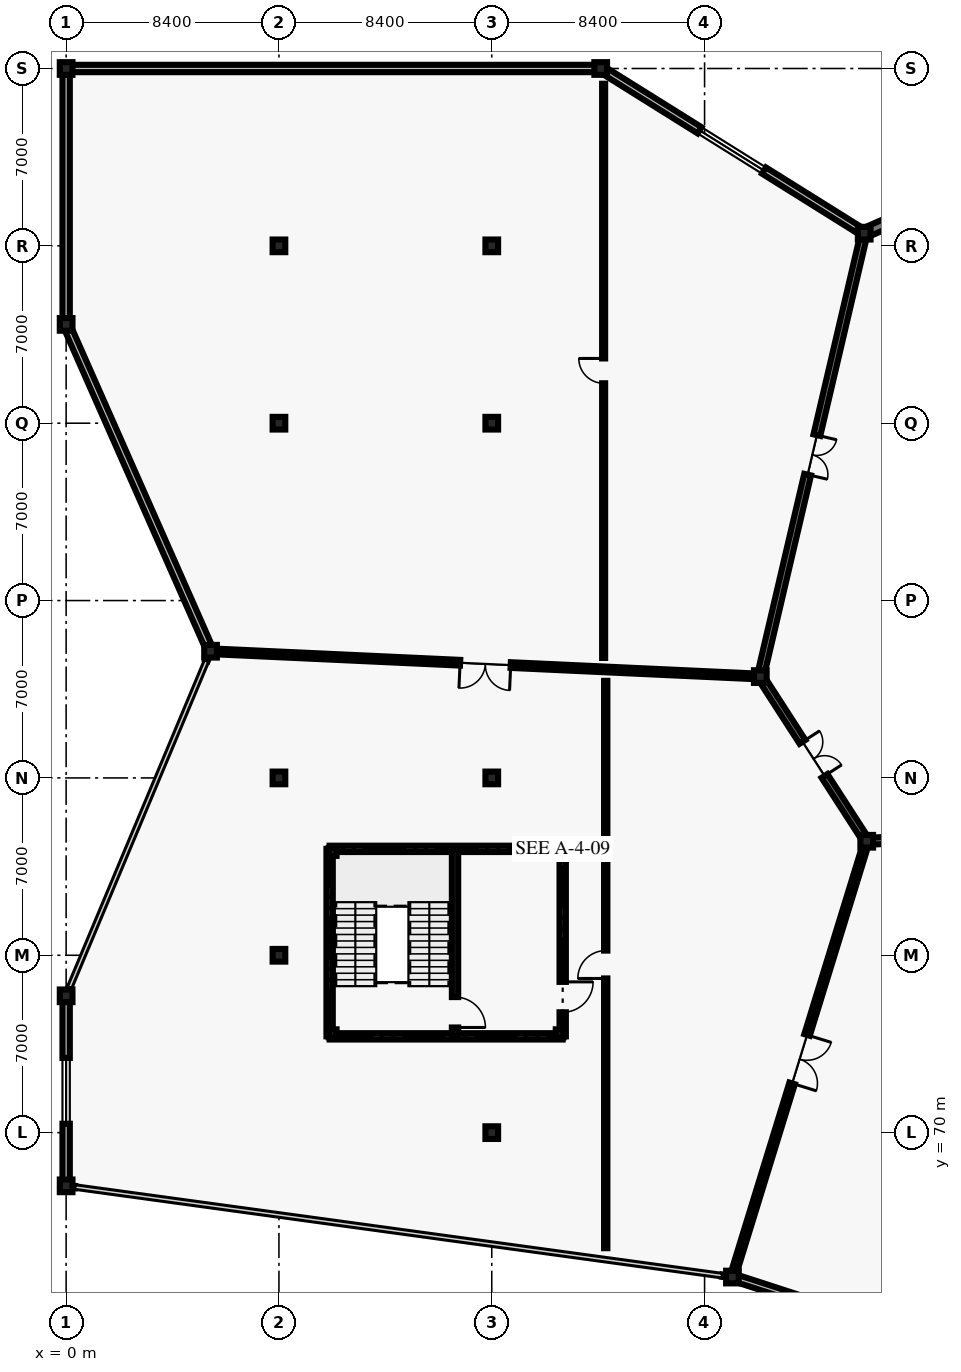
"""IFC4 building model, lengths in metres.
Left out: names, types, materials, properties, quantities, classifications, styles, units other than length and angle.
Written with IfcOpenShell. Run it as: python <this file> out.ifc"""

import sys

from ifc_helpers import new_model, si_unit, direction, frame, frame_2d, origin, origin_2d, place, context, subcontext, project, spatial, rectangle, i_section, extrude, element, fill, save


model = new_model("IFC4")
c1 = context("Model", 3, precision=1e-05, world=origin(), true_north=direction((0.0, 1.0)))
c2 = subcontext(c1, "Body", "Model", "MODEL_VIEW")
j1 = project(units=[si_unit("LENGTHUNIT", "METRE"), si_unit("PLANEANGLEUNIT", "RADIAN")], contexts=[c1])
p1 = place(None, origin())
s1 = spatial("IfcSite", under=j1, at=p1, CompositionType="ELEMENT")
p2 = place(p1, origin())
s2 = spatial("IfcBuilding", under=s1, at=p2, CompositionType="ELEMENT")
p3 = place(p2, frame((0.0, 0.0, 5.4)))
s3 = spatial("IfcBuildingStorey", under=s2, at=p3, CompositionType="ELEMENT", Elevation=5.4)
for number, where, z_axis, x_axis in (
    (1, (0.0, 67.9, 0.0), (0.0, 0.0, 1.0), (1.0, 0.0, 0.0)),
    (2, (0.0, 75.4, 0.0), (0.0, 0.0, 1.0), (1.0, 0.0, 0.0)),
    (3, (0.0, 101.9, 0.0), (0.0, 0.0, 1.0), (1.0, 0.0, 0.0)),
    (4, (0.0, 112.0, 0.0), (0.0, 0.0, 1.0), (1.0, 0.0, 0.0)),
    (5, (5.7, 89.0, 0.0), (0.0, 0.0, 1.0), (1.0, 0.0, 0.0)),
    (6, (21.1, 112.0, 0.0), (0.0, 0.0, 1.0), (1.0, 0.0, 0.0)),
    (7, (26.3, 64.3, 0.0), (0.0, 0.0, 1.0), (1.0, 0.0, 0.0)),
    (8, (27.4, 88.0, 0.0), (0.0, 0.0, 1.0), (1.0, 0.0, 0.0)),
    (9, (31.5, 105.5, 0.0), (0.0, 0.0, 1.0), (1.0, 0.0, 0.0)),
    (10, (31.6, 81.5, 0.0), (0.0, 0.0, 1.0), (1.0, 0.0, 0.0)),
    (11, (8.4, 77.0, 0.0), (0.0, 0.0, 1.0), (1.0, 0.0, 0.0)),
    (12, (8.4, 84.0, 0.0), (0.0, 0.0, 1.0), (1.0, 0.0, 0.0)),
    (13, (16.8, 70.0, 0.0), (0.0, 0.0, 1.0), (1.0, 0.0, 0.0)),
    (14, (16.8, 84.0, 0.0), (0.0, 0.0, 1.0), (1.0, 0.0, 0.0)),
    (15, (8.4, 98.0, 0.0), (0.0, 0.0, 1.0), (1.0, 0.0, 0.0)),
    (16, (8.4, 105.0, 0.0), (0.0, 0.0, 1.0), (1.0, 0.0, 0.0)),
    (17, (16.8, 98.0, 0.0), (0.0, 0.0, 1.0), (1.0, 0.0, 0.0)),
    (18, (16.8, 105.0, 0.0), (0.0, 0.0, 1.0), (1.0, 0.0, 0.0)),
):
    element("IfcColumn", number, at=place(p3, frame(where, z_axis=z_axis, x_axis=x_axis)), inside=s3, PredefinedType="COLUMN", context=c2, shape_type="SweptSolid", body=[
        extrude(rectangle(XDim=0.5, YDim=0.5, at=origin_2d()), origin(), (0.0, 0.0, 1.0), 4.8),
    ])
for number, where, z_axis, x_axis in (
    (19, (10.52, 73.92, 0.0), (0.0, 0.0, 1.0), (1.0, 0.0, 0.0)),
    (20, (19.48, 73.92, 0.0), (0.0, 0.0, 1.0), (1.0, 0.0, 0.0)),
    (21, (19.48, 81.08, 0.0), (0.0, 0.0, 1.0), (1.0, 0.0, 0.0)),
    (22, (10.52, 81.08, 0.0), (0.0, 0.0, 1.0), (1.0, 0.0, 0.0)),
):
    element("IfcColumn", number, at=place(p3, frame(where, z_axis=z_axis, x_axis=x_axis)), inside=s3, PredefinedType="COLUMN", context=c2, shape_type="SweptSolid", body=[
        extrude(i_section(OverallWidth=0.307, OverallDepth=0.315, WebThickness=0.012, FlangeThickness=0.019, FilletRadius=0.017, at=origin_2d()), origin(), (0.0, 0.0, 1.0), 4.8),
    ])
p4 = place(p3, frame((49.943, 56.619, 0.0), z_axis=(0.0, 0.0, 1.0), x_axis=(-0.951074357174, 0.308962080402, 0.0)))
e23 = element("IfcWall", 23, at=p4, inside=s3, PredefinedType="SOLIDWALL", context=c2, shape_type="SweptSolid", body=[
    extrude(rectangle(XDim=24.8, YDim=0.29, at=frame_2d((12.4, 0.0))), origin(), (0.0, 0.0, 1.0), 3.62),
])
p5 = place(p4, frame((11.3, 0.0, 0.95)))
e24 = element("IfcOpeningElement", 24, at=p5, cuts=e23, PredefinedType="OPENING", context=c2, shape_type="SweptSolid", body=[
    extrude(rectangle(XDim=2.2, YDim=2.1, at=frame_2d((1.1, 1.05))), frame((0.0, 0.155, 0.0), z_axis=(0.0, -1.0, 0.0), x_axis=(1.0, 0.0, 0.0)), (0.0, 0.0, 1.0), 0.31),
])
p6 = place(p3, frame((31.555, 105.524, 0.0), z_axis=(0.0, 0.0, 1.0), x_axis=(0.915561631163, 0.402177696474, 0.0)))
e25 = element("IfcWall", 25, at=p6, inside=s3, PredefinedType="SOLIDWALL", context=c2, shape_type="SweptSolid", body=[
    extrude(rectangle(XDim=11.627, YDim=0.4, at=frame_2d((5.813, 0.0))), origin(), (0.0, 0.0, 1.0), 3.62),
])
p7 = place(p3, frame((0.0, 67.9, 0.0), z_axis=(0.0, 0.0, 1.0), x_axis=(0.0, 1.0, 0.0)))
e26 = element("IfcWall", 26, at=p7, inside=s3, PredefinedType="SOLIDWALL", context=c2, shape_type="SweptSolid", body=[
    extrude(rectangle(XDim=7.5, YDim=0.29, at=frame_2d((3.75, 0.0))), origin(), (0.0, 0.0, 1.0), 3.62),
])
p8 = place(p7, frame((2.45, 0.0, 0.95)))
e27 = element("IfcOpeningElement", 27, at=p8, cuts=e26, PredefinedType="OPENING", context=c2, shape_type="SweptSolid", body=[
    extrude(rectangle(XDim=2.6, YDim=2.1, at=frame_2d((1.3, 1.05))), frame((0.0, 0.155, 0.0), z_axis=(0.0, -1.0, 0.0), x_axis=(1.0, 0.0, 0.0)), (0.0, 0.0, 1.0), 0.31),
])
for number, where, z_axis, x_axis in (
    (28, (26.199, 64.314, 0.0), (0.0, 0.0, 1.0), (-0.991, 0.133, 0.0)),
    (29, (0.347, 67.853, 0.0), (0.0, 0.0, 1.0), (-0.991, 0.133, 0.0)),
):
    element("IfcWall", number, at=place(p3, frame(where, z_axis=z_axis, x_axis=x_axis)), inside=s3, PredefinedType="SOLIDWALL", context=c2, shape_type="SweptSolid", body=[
        extrude(rectangle(XDim=0.308, YDim=0.095, at=frame_2d((0.154, 0.0))), origin(), (0.0, 0.0, 1.0), 3.62),
    ])
for number, where, z_axis, x_axis in (
    (30, (0.016, 75.439, 0.0), (0.0, 0.0, 1.0), (0.386, 0.922, 0.0)),
    (31, (5.542, 88.622, 0.0), (0.0, 0.0, 1.0), (0.386, 0.922, 0.0)),
):
    element("IfcWall", number, at=place(p3, frame(where, z_axis=z_axis, x_axis=x_axis)), inside=s3, PredefinedType="SOLIDWALL", context=c2, shape_type="SweptSolid", body=[
        extrude(rectangle(XDim=0.308, YDim=0.095, at=frame_2d((0.154, 0.0))), origin(), (0.0, 0.0, 1.0), 3.62),
    ])
p9 = place(p3, frame((21.1, 112.0, 0.0), z_axis=(0.0, 0.0, 1.0), x_axis=(0.84799942789, -0.529997141784, 0.0)))
e32 = element("IfcWall", 32, at=p9, inside=s3, PredefinedType="SOLIDWALL", context=c2, shape_type="SweptSolid", body=[
    extrude(rectangle(XDim=12.204, YDim=0.29, at=frame_2d((6.102, 0.0))), origin(), (0.0, 0.0, 1.0), 3.62),
])
p10 = place(p9, frame((4.602, 0.0, 0.95)))
e33 = element("IfcOpeningElement", 33, at=p10, cuts=e32, PredefinedType="OPENING", context=c2, shape_type="SweptSolid", body=[
    extrude(rectangle(XDim=3.0, YDim=2.1, at=frame_2d((1.5, 1.05))), frame((0.0, 0.155, 0.0), z_axis=(0.0, -1.0, 0.0), x_axis=(1.0, 0.0, 0.0)), (0.0, 0.0, 1.0), 0.31),
])
p11 = place(p3, frame((0.0, 112.0, 0.0), z_axis=(0.0, 0.0, 1.0), x_axis=(1.0, 0.0, 0.0)))
e34 = element("IfcWall", 34, at=p11, inside=s3, PredefinedType="SOLIDWALL", context=c2, shape_type="SweptSolid", body=[
    extrude(rectangle(XDim=21.1, YDim=0.29, at=frame_2d((10.55, 0.0))), origin(), (0.0, 0.0, 1.0), 3.62),
])
p12 = place(p3, frame((0.0, 101.9, 0.0), z_axis=(0.0, 0.0, 1.0), x_axis=(0.0, 1.0, 0.0)))
e35 = element("IfcWall", 35, at=p12, inside=s3, PredefinedType="SOLIDWALL", context=c2, shape_type="SweptSolid", body=[
    extrude(rectangle(XDim=10.1, YDim=0.29, at=frame_2d((5.05, 0.0))), origin(), (0.0, 0.0, 1.0), 3.62),
])
p13 = place(p3, frame((5.676, 89.055, 0.0), z_axis=(0.0, 0.0, 1.0), x_axis=(-0.404184143846, 0.914677636035, 0.0)))
e36 = element("IfcWall", 36, at=p13, inside=s3, PredefinedType="SOLIDWALL", context=c2, shape_type="SweptSolid", body=[
    extrude(rectangle(XDim=14.043, YDim=0.29, at=frame_2d((7.021, 0.0))), origin(), (0.0, 0.0, 1.0), 3.62),
])
p14 = place(p3, frame((57.8, 82.6, 0.0), z_axis=(0.0, 0.0, 1.0), x_axis=(-0.999119645224, -0.041951573605, 0.0)))
e37 = element("IfcWall", 37, at=p14, inside=s3, PredefinedType="SOLIDWALL", context=c2, shape_type="SweptSolid", body=[
    extrude(rectangle(XDim=26.223, YDim=0.275, at=frame_2d((13.112, 0.0))), origin(), (0.0, 0.0, 1.0), 4.02),
])
p15 = place(p14, frame((12.312, 0.0, 0.0)))
e38 = element("IfcOpeningElement", 38, at=p15, cuts=e37, PredefinedType="OPENING", context=c2, shape_type="SweptSolid", body=[
    extrude(rectangle(XDim=1.6, YDim=2.45, at=frame_2d((0.8, 1.225))), frame((0.0, 0.147, 0.0), z_axis=(0.0, -1.0, 0.0), x_axis=(1.0, 0.0, 0.0)), (0.0, 0.0, 1.0), 0.295),
])
p16 = place(p3, frame((31.6, 81.5, 0.0), z_axis=(0.0, 0.0, 1.0), x_axis=(-0.294479498062, -0.955657797133, 0.0)))
e39 = element("IfcWall", 39, at=p16, inside=s3, PredefinedType="SOLIDWALL", context=c2, shape_type="SweptSolid", body=[
    extrude(rectangle(XDim=17.998, YDim=0.225, at=frame_2d((8.999, 0.0))), origin(), (0.0, 0.0, 1.0), 4.02),
])
p17 = place(p16, frame((7.999, 0.0, 0.0)))
e40 = element("IfcOpeningElement", 40, at=p17, cuts=e39, PredefinedType="OPENING", context=c2, shape_type="SweptSolid", body=[
    extrude(rectangle(XDim=2.0, YDim=2.5, at=frame_2d((1.0, 1.25))), frame((0.0, 0.123, 0.0), z_axis=(0.0, -1.0, 0.0), x_axis=(1.0, 0.0, 0.0)), (0.0, 0.0, 1.0), 0.245),
])
p18 = place(p3, frame((27.4, 88.0, 0.0), z_axis=(0.0, 0.0, 1.0), x_axis=(0.542733189748, -0.839905164138, 0.0)))
e41 = element("IfcWall", 41, at=p18, inside=s3, PredefinedType="SOLIDWALL", context=c2, shape_type="SweptSolid", body=[
    extrude(rectangle(XDim=7.739, YDim=0.275, at=frame_2d((3.87, 0.0))), origin(), (0.0, 0.0, 1.0), 4.02),
])
p19 = place(p18, frame((3.069, 0.0, 0.0)))
e42 = element("IfcOpeningElement", 42, at=p19, cuts=e41, PredefinedType="OPENING", context=c2, shape_type="SweptSolid", body=[
    extrude(rectangle(XDim=1.6, YDim=2.45, at=frame_2d((0.8, 1.225))), frame((0.0, 0.147, 0.0), z_axis=(0.0, -1.0, 0.0), x_axis=(1.0, 0.0, 0.0)), (0.0, 0.0, 1.0), 0.295),
])
p20 = place(p3, frame((31.5, 105.5, 0.0), z_axis=(0.0, 0.0, 1.0), x_axis=(-0.228114067381, -0.973634414071, 0.0)))
e43 = element("IfcWall", 43, at=p20, inside=s3, PredefinedType="SOLIDWALL", context=c2, shape_type="SweptSolid", body=[
    extrude(rectangle(XDim=17.974, YDim=0.275, at=frame_2d((8.987, 0.0))), origin(), (0.0, 0.0, 1.0), 4.02),
])
p21 = place(p20, frame((8.187, 0.0, 0.0)))
e44 = element("IfcOpeningElement", 44, at=p21, cuts=e43, PredefinedType="OPENING", context=c2, shape_type="SweptSolid", body=[
    extrude(rectangle(XDim=1.6, YDim=2.45, at=frame_2d((0.8, 1.225))), frame((0.0, 0.147, 0.0), z_axis=(0.0, -1.0, 0.0), x_axis=(1.0, 0.0, 0.0)), (0.0, 0.0, 1.0), 0.295),
])
p22 = place(p3, frame((27.4, 88.0, 0.0), z_axis=(0.0, 0.0, 1.0), x_axis=(-0.998939864331, 0.046034198714, 0.0)))
e45 = element("IfcWall", 45, at=p22, inside=s3, PredefinedType="SOLIDWALL", context=c2, shape_type="SweptSolid", body=[
    extrude(rectangle(XDim=21.723, YDim=0.225, at=frame_2d((10.861, 0.0))), origin(), (0.0, 0.0, 1.0), 4.02),
])
p23 = place(p22, frame((9.862, 0.0, 0.0)))
e46 = element("IfcOpeningElement", 46, at=p23, cuts=e45, PredefinedType="OPENING", context=c2, shape_type="SweptSolid", body=[
    extrude(rectangle(XDim=2.0, YDim=2.5, at=frame_2d((1.0, 1.25))), frame((0.0, 0.123, 0.0), z_axis=(0.0, -1.0, 0.0), x_axis=(1.0, 0.0, 0.0)), (0.0, 0.0, 1.0), 0.245),
])
p24 = place(p3, frame((21.298, 65.439, 0.0), z_axis=(0.0, 0.0, 1.0), x_axis=(0.0, 1.0, 0.0)))
e47 = element("IfcWall", 47, at=p24, inside=s3, PredefinedType="PARTITIONING", context=c2, shape_type="SweptSolid", body=[
    extrude(rectangle(XDim=22.392, YDim=0.13, at=frame_2d((11.196, 0.0))), origin(), (0.0, 0.0, 1.0), 3.32),
])
p25 = place(p24, frame((10.646, 0.0, 0.0)))
e48 = element("IfcOpeningElement", 48, at=p25, cuts=e47, PredefinedType="OPENING", context=c2, shape_type="SweptSolid", body=[
    extrude(rectangle(XDim=1.1, YDim=2.2, at=frame_2d((0.55, 1.1))), frame((0.0, 0.075, 0.0), z_axis=(0.0, -1.0, 0.0), x_axis=(1.0, 0.0, 0.0)), (0.0, 0.0, 1.0), 0.15),
])
p26 = place(p3, frame((21.216, 88.735, 0.0), z_axis=(0.0, 0.0, 1.0), x_axis=(0.0, 1.0, 0.0)))
e49 = element("IfcWall", 49, at=p26, inside=s3, PredefinedType="PARTITIONING", context=c2, shape_type="SweptSolid", body=[
    extrude(rectangle(XDim=22.662, YDim=0.12, at=frame_2d((11.331, 0.0))), origin(), (0.0, 0.0, 1.0), 3.32),
])
p27 = place(p26, frame((10.841, 0.0, 0.0)))
e50 = element("IfcOpeningElement", 50, at=p27, cuts=e49, PredefinedType="OPENING", context=c2, shape_type="SweptSolid", body=[
    extrude(rectangle(XDim=0.98, YDim=2.15, at=frame_2d((0.49, 1.075))), frame((0.0, 0.07, 0.0), z_axis=(0.0, -1.0, 0.0), x_axis=(1.0, 0.0, 0.0)), (0.0, 0.0, 1.0), 0.14),
])
p28 = place(p3, frame((10.4, 73.8, 0.0), z_axis=(0.0, 0.0, 1.0), x_axis=(0.0, 1.0, 0.0)))
e51 = element("IfcWall", 51, at=p28, inside=s3, PredefinedType="SHEAR", context=c2, shape_type="SweptSolid", body=[
    extrude(rectangle(XDim=7.4, YDim=0.25, at=frame_2d((3.7, 0.0))), origin(), (0.0, 0.0, 1.0), 4.56),
])
for number, where, z_axis, x_axis in (
    (52, (10.4, 81.2, 0.0), (0.0, 0.0, 1.0), (1.0, 0.0, 0.0)),
    (53, (19.6, 73.8, 0.0), (0.0, 0.0, 1.0), (-1.0, 0.0, 0.0)),
):
    element("IfcWall", number, at=place(p3, frame(where, z_axis=z_axis, x_axis=x_axis)), inside=s3, PredefinedType="SHEAR", context=c2, shape_type="SweptSolid", body=[
        extrude(rectangle(XDim=9.2, YDim=0.25, at=frame_2d((4.6, 0.0))), origin(), (0.0, 0.0, 1.0), 4.56),
    ])
p29 = place(p3, frame((19.6, 81.2, 0.0), z_axis=(0.0, 0.0, 1.0), x_axis=(0.0, -1.0, 0.0)))
e54 = element("IfcWall", 54, at=p29, inside=s3, PredefinedType="SHEAR", context=c2, shape_type="SweptSolid", body=[
    extrude(rectangle(XDim=7.4, YDim=0.25, at=frame_2d((3.7, 0.0))), origin(), (0.0, 0.0, 1.0), 4.56),
])
p30 = place(p29, frame((5.25, 0.0, 0.0)))
e55 = element("IfcOpeningElement", 55, at=p30, cuts=e54, PredefinedType="OPENING", context=c2, shape_type="SweptSolid", body=[
    extrude(rectangle(XDim=1.2, YDim=2.2, at=frame_2d((0.6, 1.1))), frame((0.0, 0.135, 0.0), z_axis=(0.0, -1.0, 0.0), x_axis=(1.0, 0.0, 0.0)), (0.0, 0.0, 1.0), 0.27),
])
p31 = place(p3, frame((15.35, 81.2, 0.0), z_axis=(0.0, 0.0, 1.0), x_axis=(0.0, -1.0, 0.0)))
e56 = element("IfcWall", 56, at=p31, inside=s3, PredefinedType="SHEAR", context=c2, shape_type="SweptSolid", body=[
    extrude(rectangle(XDim=7.4, YDim=0.25, at=frame_2d((3.7, 0.0))), origin(), (0.0, 0.0, 1.0), 4.56),
])
p32 = place(p31, frame((5.85, 0.0, 0.0)))
e57 = element("IfcOpeningElement", 57, at=p32, cuts=e56, PredefinedType="OPENING", context=c2, shape_type="SweptSolid", body=[
    extrude(rectangle(XDim=1.2, YDim=2.2, at=frame_2d((0.6, 1.1))), frame((0.0, 0.135, 0.0), z_axis=(0.0, -1.0, 0.0), x_axis=(1.0, 0.0, 0.0)), (0.0, 0.0, 1.0), 0.27),
])
p33 = place(p8, origin())
e58 = element("IfcWindow", 58, at=p33, inside=s3, PartitioningType="SINGLE_PANEL", PredefinedType="WINDOW", context=c2, shape_type="SweptSolid", body=[
    extrude(rectangle(XDim=2.6, YDim=2.1, at=frame_2d((1.3, 1.05))), frame((0.0, 0.03, 0.0), z_axis=(0.0, -1.0, 0.0), x_axis=(1.0, 0.0, 0.0)), (0.0, 0.0, 1.0), 0.06),
])
fill(e27, e58)
p34 = place(p10, origin())
e59 = element("IfcWindow", 59, at=p34, inside=s3, PartitioningType="SINGLE_PANEL", PredefinedType="WINDOW", context=c2, shape_type="SweptSolid", body=[
    extrude(rectangle(XDim=3.0, YDim=2.1, at=frame_2d((1.5, 1.05))), frame((0.0, 0.03, 0.0), z_axis=(0.0, -1.0, 0.0), x_axis=(1.0, 0.0, 0.0)), (0.0, 0.0, 1.0), 0.06),
])
fill(e33, e59)
p35 = place(p17, origin())
e60 = element("IfcDoor", 60, at=p35, inside=s3, OperationType="DOUBLE_DOOR_SINGLE_SWING", PredefinedType="DOOR", context=c2, shape_type="SweptSolid", body=[
    extrude(rectangle(XDim=2.0, YDim=2.5, at=frame_2d((1.0, 1.25))), frame((0.0, 0.025, 0.0), z_axis=(0.0, -1.0, 0.0), x_axis=(1.0, 0.0, 0.0)), (0.0, 0.0, 1.0), 0.05),
])
fill(e40, e60)
p36 = place(p19, origin())
e61 = element("IfcDoor", 61, at=p36, inside=s3, OperationType="DOUBLE_DOOR_SINGLE_SWING", PredefinedType="DOOR", context=c2, shape_type="SweptSolid", body=[
    extrude(rectangle(XDim=1.6, YDim=2.45, at=frame_2d((0.8, 1.225))), frame((0.0, 0.025, 0.0), z_axis=(0.0, -1.0, 0.0), x_axis=(1.0, 0.0, 0.0)), (0.0, 0.0, 1.0), 0.05),
])
fill(e42, e61)
p37 = place(p21, origin())
e62 = element("IfcDoor", 62, at=p37, inside=s3, OperationType="DOUBLE_DOOR_SINGLE_SWING", PredefinedType="DOOR", context=c2, shape_type="SweptSolid", body=[
    extrude(rectangle(XDim=1.6, YDim=2.45, at=frame_2d((0.8, 1.225))), frame((0.0, 0.025, 0.0), z_axis=(0.0, -1.0, 0.0), x_axis=(1.0, 0.0, 0.0)), (0.0, 0.0, 1.0), 0.05),
])
fill(e44, e62)
p38 = place(p23, origin())
e63 = element("IfcDoor", 63, at=p38, inside=s3, OperationType="DOUBLE_DOOR_SINGLE_SWING", PredefinedType="DOOR", context=c2, shape_type="SweptSolid", body=[
    extrude(rectangle(XDim=2.0, YDim=2.5, at=frame_2d((1.0, 1.25))), frame((0.0, 0.025, 0.0), z_axis=(0.0, -1.0, 0.0), x_axis=(1.0, 0.0, 0.0)), (0.0, 0.0, 1.0), 0.05),
])
fill(e46, e63)
p39 = place(p25, origin())
e64 = element("IfcDoor", 64, at=p39, inside=s3, OperationType="SINGLE_SWING_LEFT", PredefinedType="DOOR", context=c2, shape_type="SweptSolid", body=[
    extrude(rectangle(XDim=1.1, YDim=2.2, at=frame_2d((0.55, 1.1))), frame((0.0, 0.025, 0.0), z_axis=(0.0, -1.0, 0.0), x_axis=(1.0, 0.0, 0.0)), (0.0, 0.0, 1.0), 0.05),
])
fill(e48, e64)
p40 = place(p27, origin())
e65 = element("IfcDoor", 65, at=p40, inside=s3, OperationType="SINGLE_SWING_RIGHT", PredefinedType="DOOR", context=c2, shape_type="SweptSolid", body=[
    extrude(rectangle(XDim=0.98, YDim=2.15, at=frame_2d((0.49, 1.075))), frame((0.0, 0.025, 0.0), z_axis=(0.0, -1.0, 0.0), x_axis=(1.0, 0.0, 0.0)), (0.0, 0.0, 1.0), 0.05),
])
fill(e50, e65)
p41 = place(p30, origin())
e66 = element("IfcDoor", 66, at=p41, inside=s3, OperationType="SINGLE_SWING_LEFT", PredefinedType="DOOR", context=c2, shape_type="SweptSolid", body=[
    extrude(rectangle(XDim=1.2, YDim=2.2, at=frame_2d((0.6, 1.1))), frame((0.0, 0.025, 0.0), z_axis=(0.0, -1.0, 0.0), x_axis=(1.0, 0.0, 0.0)), (0.0, 0.0, 1.0), 0.05),
])
fill(e55, e66)
p42 = place(p32, origin())
e67 = element("IfcDoor", 67, at=p42, inside=s3, OperationType="SINGLE_SWING_RIGHT", PredefinedType="DOOR", context=c2, shape_type="SweptSolid", body=[
    extrude(rectangle(XDim=1.2, YDim=2.2, at=frame_2d((0.6, 1.1))), frame((0.0, 0.025, 0.0), z_axis=(0.0, -1.0, 0.0), x_axis=(1.0, 0.0, 0.0)), (0.0, 0.0, 1.0), 0.05),
])
fill(e57, e67)
save(model, sys.argv[1])
